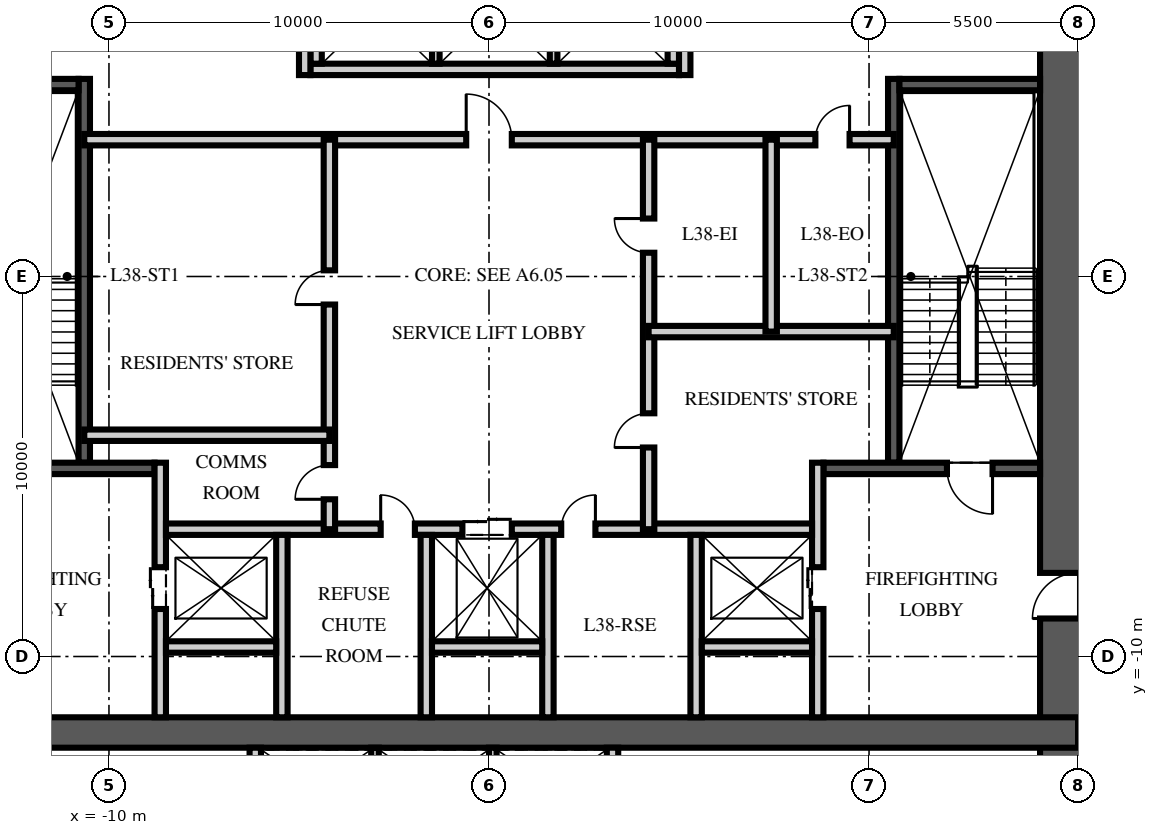
"""IFC4 building model, lengths in metres.
Left out: names, types, materials, properties, quantities, classifications, styles, units other than length and angle.
Written with IfcOpenShell. Run it as: python <this file> out.ifc"""

import sys

from ifc_helpers import new_model, si_unit, direction, frame, frame_2d, origin, place, context, subcontext, project, spatial, rectangle, extrude, element, fill, save


model = new_model("IFC4")
c1 = context("Model", 3, precision=1e-05, world=origin(), true_north=direction((0.0, 1.0)))
c2 = subcontext(c1, "Body", "Model", "MODEL_VIEW")
j1 = project(units=[si_unit("LENGTHUNIT", "METRE"), si_unit("PLANEANGLEUNIT", "RADIAN")], contexts=[c1])
p1 = place(None, origin())
s1 = spatial("IfcSite", under=j1, at=p1, CompositionType="ELEMENT")
p2 = place(p1, origin())
s2 = spatial("IfcBuilding", under=s1, at=p2, CompositionType="ELEMENT")
p3 = place(p2, frame((0.0, 0.0, 152.25)))
s3 = spatial("IfcBuildingStorey", under=s2, at=p3, CompositionType="ELEMENT", Elevation=152.25)
p4 = place(p3, frame((15.5, -15.5, -0.25), z_axis=(0.0, 0.0, 1.0), x_axis=(0.0, 1.0, 0.0)))
e1 = element("IfcWall", 1, at=p4, inside=s3, PredefinedType="SHEAR", context=c2, shape_type="SweptSolid", body=[
    extrude(rectangle(XDim=31.0, YDim=2.0, at=frame_2d((15.5, 0.0))), origin(), (0.0, 0.0, 1.0), 3.75),
])
p5 = place(p4, frame((6.5, 0.0, 0.25)))
e2 = element("IfcOpeningElement", 2, at=p5, cuts=e1, PredefinedType="OPENING", context=c2, shape_type="SweptSolid", body=[
    extrude(rectangle(XDim=1.2, YDim=2.1, at=frame_2d((0.6, 1.05))), frame((0.0, 1.01, 0.0), z_axis=(0.0, -1.0, 0.0), x_axis=(1.0, 0.0, 0.0)), (0.0, 0.0, 1.0), 2.02),
])
p6 = place(p4, frame((23.0, 0.0, 0.25)))
e3 = element("IfcOpeningElement", 3, at=p6, cuts=e1, PredefinedType="OPENING", context=c2, shape_type="SweptSolid", body=[
    extrude(rectangle(XDim=1.8, YDim=2.1, at=frame_2d((0.9, 1.05))), frame((0.0, 1.01, 0.0), z_axis=(0.0, -1.0, 0.0), x_axis=(1.0, 0.0, 0.0)), (0.0, 0.0, 1.0), 2.02),
])
p7 = place(p3, frame((-15.5, -12.0, -0.25), z_axis=(0.0, 0.0, 1.0), x_axis=(1.0, 0.0, 0.0)))
e4 = element("IfcWall", 4, at=p7, inside=s3, PredefinedType="SHEAR", context=c2, shape_type="SweptSolid", body=[
    extrude(rectangle(XDim=31.0, YDim=0.8, at=frame_2d((15.5, 0.0))), origin(), (0.0, 0.0, 1.0), 3.75),
])
p8 = place(p3, frame((-10.65, -4.9, 0.0), z_axis=(0.0, 0.0, 1.0), x_axis=(0.0, 1.0, 0.0)))
e5 = element("IfcWall", 5, at=p8, inside=s3, PredefinedType="SOLIDWALL", context=c2, shape_type="SweptSolid", body=[
    extrude(rectangle(XDim=10.1, YDim=0.3, at=frame_2d((5.05, 0.0))), origin(), (0.0, 0.0, 1.0), 3.5),
])
p9 = place(p3, frame((-14.5, -5.05, 0.0), z_axis=(0.0, 0.0, 1.0), x_axis=(1.0, 0.0, 0.0)))
e6 = element("IfcWall", 6, at=p9, inside=s3, PredefinedType="SOLIDWALL", context=c2, shape_type="SweptSolid", body=[
    extrude(rectangle(XDim=5.7, YDim=0.3, at=frame_2d((2.85, 0.0))), origin(), (0.0, 0.0, 1.0), 3.5),
])
p10 = place(p9, frame((1.25, 0.0, 0.0)))
e7 = element("IfcOpeningElement", 7, at=p10, cuts=e6, PredefinedType="OPENING", context=c2, shape_type="SweptSolid", body=[
    extrude(rectangle(XDim=1.2, YDim=2.1, at=frame_2d((0.6, 1.05))), frame((0.0, 0.16, 0.0), z_axis=(0.0, -1.0, 0.0), x_axis=(1.0, 0.0, 0.0)), (0.0, 0.0, 1.0), 0.32),
])
p11 = place(p3, frame((-14.5, 5.05, 0.0), z_axis=(0.0, 0.0, 1.0), x_axis=(1.0, 0.0, 0.0)))
e8 = element("IfcWall", 8, at=p11, inside=s3, PredefinedType="SOLIDWALL", context=c2, shape_type="SweptSolid", body=[
    extrude(rectangle(XDim=3.7, YDim=0.3, at=frame_2d((1.85, 0.0))), origin(), (0.0, 0.0, 1.0), 3.5),
])
p12 = place(p3, frame((-8.65, -11.6, 0.0), z_axis=(0.0, 0.0, 1.0), x_axis=(0.0, 1.0, 0.0)))
e9 = element("IfcWall", 9, at=p12, inside=s3, PredefinedType="PARTITIONING", context=c2, shape_type="SweptSolid", body=[
    extrude(rectangle(XDim=6.7, YDim=0.3, at=frame_2d((3.35, 0.0))), origin(), (0.0, 0.0, 1.0), 3.5),
])
p13 = place(p12, frame((2.85, 0.0, 0.0)))
e10 = element("IfcOpeningElement", 10, at=p13, cuts=e9, PredefinedType="OPENING", context=c2, shape_type="SweptSolid", body=[
    extrude(rectangle(XDim=1.1, YDim=2.1, at=frame_2d((0.55, 1.05))), frame((0.0, 0.16, 0.0), z_axis=(0.0, -1.0, 0.0), x_axis=(1.0, 0.0, 0.0)), (0.0, 0.0, 1.0), 0.32),
])
p14 = place(p3, frame((10.65, -4.9, 0.0), z_axis=(0.0, 0.0, 1.0), x_axis=(0.0, 1.0, 0.0)))
e11 = element("IfcWall", 11, at=p14, inside=s3, PredefinedType="SOLIDWALL", context=c2, shape_type="SweptSolid", body=[
    extrude(rectangle(XDim=10.1, YDim=0.3, at=frame_2d((5.05, 0.0))), origin(), (0.0, 0.0, 1.0), 3.5),
])
p15 = place(p3, frame((14.5, -5.05, 0.0), z_axis=(0.0, 0.0, 1.0), x_axis=(-1.0, 0.0, 0.0)))
e12 = element("IfcWall", 12, at=p15, inside=s3, PredefinedType="SOLIDWALL", context=c2, shape_type="SweptSolid", body=[
    extrude(rectangle(XDim=5.7, YDim=0.3, at=frame_2d((2.85, 0.0))), origin(), (0.0, 0.0, 1.0), 3.5),
])
p16 = place(p15, frame((1.25, 0.0, 0.0)))
e13 = element("IfcOpeningElement", 13, at=p16, cuts=e12, PredefinedType="OPENING", context=c2, shape_type="SweptSolid", body=[
    extrude(rectangle(XDim=1.2, YDim=2.1, at=frame_2d((0.6, 1.05))), frame((0.0, 0.16, 0.0), z_axis=(0.0, -1.0, 0.0), x_axis=(1.0, 0.0, 0.0)), (0.0, 0.0, 1.0), 0.32),
])
p17 = place(p3, frame((14.5, 5.05, 0.0), z_axis=(0.0, 0.0, 1.0), x_axis=(-1.0, 0.0, 0.0)))
e14 = element("IfcWall", 14, at=p17, inside=s3, PredefinedType="SOLIDWALL", context=c2, shape_type="SweptSolid", body=[
    extrude(rectangle(XDim=3.7, YDim=0.3, at=frame_2d((1.85, 0.0))), origin(), (0.0, 0.0, 1.0), 3.5),
])
p18 = place(p3, frame((8.65, -11.6, 0.0), z_axis=(0.0, 0.0, 1.0), x_axis=(0.0, 1.0, 0.0)))
e15 = element("IfcWall", 15, at=p18, inside=s3, PredefinedType="PARTITIONING", context=c2, shape_type="SweptSolid", body=[
    extrude(rectangle(XDim=6.7, YDim=0.3, at=frame_2d((3.35, 0.0))), origin(), (0.0, 0.0, 1.0), 3.5),
])
p19 = place(p18, frame((2.85, 0.0, 0.0)))
e16 = element("IfcOpeningElement", 16, at=p19, cuts=e15, PredefinedType="OPENING", context=c2, shape_type="SweptSolid", body=[
    extrude(rectangle(XDim=1.1, YDim=2.1, at=frame_2d((0.55, 1.05))), frame((0.0, 0.16, 0.0), z_axis=(0.0, -1.0, 0.0), x_axis=(1.0, 0.0, 0.0)), (0.0, 0.0, 1.0), 0.32),
])
p20 = place(p3, frame((-8.5, -6.65, 0.0), z_axis=(0.0, 0.0, 1.0), x_axis=(1.0, 0.0, 0.0)))
e17 = element("IfcWall", 17, at=p20, inside=s3, PredefinedType="PARTITIONING", context=c2, shape_type="SweptSolid", body=[
    extrude(rectangle(XDim=17.0, YDim=0.3, at=frame_2d((8.5, 0.0))), origin(), (0.0, 0.0, 1.0), 3.5),
])
p21 = place(p20, frame((7.8, 0.0, 0.0)))
e18 = element("IfcOpeningElement", 18, at=p21, cuts=e17, PredefinedType="OPENING", context=c2, shape_type="SweptSolid", body=[
    extrude(rectangle(XDim=1.3, YDim=2.4, at=frame_2d((0.65, 1.2))), frame((0.0, 0.16, 0.0), z_axis=(0.0, -1.0, 0.0), x_axis=(1.0, 0.0, 0.0)), (0.0, 0.0, 1.0), 0.32),
])
p22 = place(p20, frame((5.65, 0.0, 0.0)))
e19 = element("IfcOpeningElement", 19, at=p22, cuts=e17, PredefinedType="OPENING", context=c2, shape_type="SweptSolid", body=[
    extrude(rectangle(XDim=0.9, YDim=2.1, at=frame_2d((0.45, 1.05))), frame((0.0, 0.16, 0.0), z_axis=(0.0, -1.0, 0.0), x_axis=(1.0, 0.0, 0.0)), (0.0, 0.0, 1.0), 0.32),
])
p23 = place(p20, frame((10.4, 0.0, 0.0)))
e20 = element("IfcOpeningElement", 20, at=p23, cuts=e17, PredefinedType="OPENING", context=c2, shape_type="SweptSolid", body=[
    extrude(rectangle(XDim=0.9, YDim=2.1, at=frame_2d((0.45, 1.05))), frame((0.0, 0.16, 0.0), z_axis=(0.0, -1.0, 0.0), x_axis=(1.0, 0.0, 0.0)), (0.0, 0.0, 1.0), 0.32),
])
for number, where, z_axis, x_axis in (
    (21, (-5.45, -11.6, 0.0), (0.0, 0.0, 1.0), (0.0, 1.0, 0.0)),
    (22, (-1.65, -11.6, 0.0), (0.0, 0.0, 1.0), (0.0, 1.0, 0.0)),
    (23, (1.55, -11.6, 0.0), (0.0, 0.0, 1.0), (0.0, 1.0, 0.0)),
    (24, (5.45, -11.6, 0.0), (0.0, 0.0, 1.0), (0.0, 1.0, 0.0)),
):
    element("IfcWall", number, at=place(p3, frame(where, z_axis=z_axis, x_axis=x_axis)), inside=s3, PredefinedType="PARTITIONING", context=c2, shape_type="SweptSolid", body=[
        extrude(rectangle(XDim=4.8, YDim=0.3, at=frame_2d((2.4, 0.0))), origin(), (0.0, 0.0, 1.0), 3.5),
    ])
for number, where, z_axis, x_axis in (
    (25, (-8.5, -9.75, 0.0), (0.0, 0.0, 1.0), (1.0, 0.0, 0.0)),
    (26, (-1.5, -9.75, 0.0), (0.0, 0.0, 1.0), (1.0, 0.0, 0.0)),
    (27, (5.6, -9.75, 0.0), (0.0, 0.0, 1.0), (1.0, 0.0, 0.0)),
):
    element("IfcWall", number, at=place(p3, frame(where, z_axis=z_axis, x_axis=x_axis)), inside=s3, PredefinedType="PARTITIONING", context=c2, shape_type="SweptSolid", body=[
        extrude(rectangle(XDim=2.9, YDim=0.3, at=frame_2d((1.45, 0.0))), origin(), (0.0, 0.0, 1.0), 3.5),
    ])
p24 = place(p3, frame((-4.7, 5.45, 0.0), z_axis=(0.0, 0.0, 1.0), x_axis=(1.0, 0.0, 0.0)))
e28 = element("IfcWall", 28, at=p24, inside=s3, PredefinedType="PARTITIONING", context=c2, shape_type="SweptSolid", body=[
    extrude(rectangle(XDim=9.7, YDim=0.3, at=frame_2d((4.85, 0.0))), origin(), (0.0, 0.0, 1.0), 3.5),
])
for number, where, z_axis, x_axis in (
    (29, (-4.55, 5.6, 0.0), (0.0, 0.0, 1.0), (0.0, 1.0, 0.0)),
    (30, (4.85, 5.6, 0.0), (0.0, 0.0, 1.0), (0.0, 1.0, 0.0)),
):
    element("IfcWall", number, at=place(p3, frame(where, z_axis=z_axis, x_axis=x_axis)), inside=s3, PredefinedType="PARTITIONING", context=c2, shape_type="SweptSolid", body=[
        extrude(rectangle(XDim=2.8, YDim=0.3, at=frame_2d((1.4, 0.0))), origin(), (0.0, 0.0, 1.0), 3.5),
    ])
for number, where, z_axis, x_axis in (
    (31, (-1.4, 5.6, 0.0), (0.0, 0.0, 1.0), (0.0, 1.0, 0.0)),
    (32, (1.7, 5.6, 0.0), (0.0, 0.0, 1.0), (0.0, 1.0, 0.0)),
):
    element("IfcWall", number, at=place(p3, frame(where, z_axis=z_axis, x_axis=x_axis)), inside=s3, PredefinedType="PARTITIONING", context=c2, shape_type="SweptSolid", body=[
        extrude(rectangle(XDim=2.8, YDim=0.2, at=frame_2d((1.4, 0.0))), origin(), (0.0, 0.0, 1.0), 3.5),
    ])
for number, where, z_axis, x_axis in (
    (33, (-6.15, -14.5, 0.0), (0.0, 0.0, 1.0), (0.0, 1.0, 0.0)),
    (34, (3.25, -14.5, 0.0), (0.0, 0.0, 1.0), (0.0, 1.0, 0.0)),
):
    element("IfcWall", number, at=place(p3, frame(where, z_axis=z_axis, x_axis=x_axis)), inside=s3, PredefinedType="PARTITIONING", context=c2, shape_type="SweptSolid", body=[
        extrude(rectangle(XDim=2.1, YDim=0.3, at=frame_2d((1.05, 0.0))), origin(), (0.0, 0.0, 1.0), 3.5),
    ])
for number, where, z_axis, x_axis in (
    (35, (-3.0, -14.5, 0.0), (0.0, 0.0, 1.0), (0.0, 1.0, 0.0)),
    (36, (0.1, -14.5, 0.0), (0.0, 0.0, 1.0), (0.0, 1.0, 0.0)),
):
    element("IfcWall", number, at=place(p3, frame(where, z_axis=z_axis, x_axis=x_axis)), inside=s3, PredefinedType="PARTITIONING", context=c2, shape_type="SweptSolid", body=[
        extrude(rectangle(XDim=2.1, YDim=0.2, at=frame_2d((1.05, 0.0))), origin(), (0.0, 0.0, 1.0), 3.5),
    ])
p25 = place(p3, frame((-10.65, 3.6, 0.0), z_axis=(0.0, 0.0, 1.0), x_axis=(1.0, 0.0, 0.0)))
e37 = element("IfcWall", 37, at=p25, inside=s3, PredefinedType="PARTITIONING", context=c2, shape_type="SweptSolid", body=[
    extrude(rectangle(XDim=21.3, YDim=0.3, at=frame_2d((10.65, 0.0))), origin(), (0.0, 0.0, 1.0), 3.5),
])
p26 = place(p25, frame((10.05, 0.0, 0.0)))
e38 = element("IfcOpeningElement", 38, at=p26, cuts=e37, PredefinedType="OPENING", context=c2, shape_type="SweptSolid", body=[
    extrude(rectangle(XDim=1.2, YDim=2.1, at=frame_2d((0.6, 1.05))), frame((0.0, 0.16, 0.0), z_axis=(0.0, -1.0, 0.0), x_axis=(1.0, 0.0, 0.0)), (0.0, 0.0, 1.0), 0.32),
])
p27 = place(p25, frame((19.238, 0.0, 0.0)))
e39 = element("IfcOpeningElement", 39, at=p27, cuts=e37, PredefinedType="OPENING", context=c2, shape_type="SweptSolid", body=[
    extrude(rectangle(XDim=0.9, YDim=2.1, at=frame_2d((0.45, 1.05))), frame((0.0, 0.16, 0.0), z_axis=(0.0, -1.0, 0.0), x_axis=(1.0, 0.0, 0.0)), (0.0, 0.0, 1.0), 0.32),
])
p28 = place(p3, frame((-4.2, -6.65, 0.0), z_axis=(0.0, 0.0, 1.0), x_axis=(0.0, 1.0, 0.0)))
e40 = element("IfcWall", 40, at=p28, inside=s3, PredefinedType="PARTITIONING", context=c2, shape_type="SweptSolid", body=[
    extrude(rectangle(XDim=10.25, YDim=0.3, at=frame_2d((5.125, 0.0))), origin(), (0.0, 0.0, 1.0), 3.5),
])
p29 = place(p28, frame((0.787, 0.0, 0.0)))
e41 = element("IfcOpeningElement", 41, at=p29, cuts=e40, PredefinedType="OPENING", context=c2, shape_type="SweptSolid", body=[
    extrude(rectangle(XDim=0.9, YDim=2.1, at=frame_2d((0.45, 1.05))), frame((0.0, 0.16, 0.0), z_axis=(0.0, -1.0, 0.0), x_axis=(1.0, 0.0, 0.0)), (0.0, 0.0, 1.0), 0.32),
])
p30 = place(p28, frame((5.912, 0.0, 0.0)))
e42 = element("IfcOpeningElement", 42, at=p30, cuts=e40, PredefinedType="OPENING", context=c2, shape_type="SweptSolid", body=[
    extrude(rectangle(XDim=0.9, YDim=2.1, at=frame_2d((0.45, 1.05))), frame((0.0, 0.16, 0.0), z_axis=(0.0, -1.0, 0.0), x_axis=(1.0, 0.0, 0.0)), (0.0, 0.0, 1.0), 0.32),
])
p31 = place(p3, frame((4.2, -6.65, 0.0), z_axis=(0.0, 0.0, 1.0), x_axis=(0.0, 1.0, 0.0)))
e43 = element("IfcWall", 43, at=p31, inside=s3, PredefinedType="PARTITIONING", context=c2, shape_type="SweptSolid", body=[
    extrude(rectangle(XDim=10.25, YDim=0.3, at=frame_2d((5.125, 0.0))), origin(), (0.0, 0.0, 1.0), 3.5),
])
p32 = place(p31, frame((2.15, 0.0, 0.0)))
e44 = element("IfcOpeningElement", 44, at=p32, cuts=e43, PredefinedType="OPENING", context=c2, shape_type="SweptSolid", body=[
    extrude(rectangle(XDim=0.9, YDim=2.1, at=frame_2d((0.45, 1.05))), frame((0.0, 0.16, 0.0), z_axis=(0.0, -1.0, 0.0), x_axis=(1.0, 0.0, 0.0)), (0.0, 0.0, 1.0), 0.32),
])
p33 = place(p31, frame((7.275, 0.0, 0.0)))
e45 = element("IfcOpeningElement", 45, at=p33, cuts=e43, PredefinedType="OPENING", context=c2, shape_type="SweptSolid", body=[
    extrude(rectangle(XDim=0.9, YDim=2.1, at=frame_2d((0.45, 1.05))), frame((0.0, 0.16, 0.0), z_axis=(0.0, -1.0, 0.0), x_axis=(1.0, 0.0, 0.0)), (0.0, 0.0, 1.0), 0.32),
])
for number, where, z_axis, x_axis in (
    (46, (-10.65, -4.177, 0.0), (0.0, 0.0, 1.0), (1.0, 0.0, 0.0)),
    (47, (10.65, -1.45, 0.0), (0.0, 0.0, 1.0), (-1.0, 0.0, 0.0)),
):
    element("IfcWall", number, at=place(p3, frame(where, z_axis=z_axis, x_axis=x_axis)), inside=s3, PredefinedType="PARTITIONING", context=c2, shape_type="SweptSolid", body=[
        extrude(rectangle(XDim=6.45, YDim=0.3, at=frame_2d((3.225, 0.0))), origin(), (0.0, 0.0, 1.0), 3.5),
    ])
p34 = place(p3, frame((7.425, -1.45, 0.0), z_axis=(0.0, 0.0, 1.0), x_axis=(0.0, 1.0, 0.0)))
e48 = element("IfcWall", 48, at=p34, inside=s3, PredefinedType="PARTITIONING", context=c2, shape_type="SweptSolid", body=[
    extrude(rectangle(XDim=5.05, YDim=0.3, at=frame_2d((2.525, 0.0))), origin(), (0.0, 0.0, 1.0), 3.5),
])
p35 = place(p3, frame((-4.85, 5.3, 0.0), z_axis=(0.0, 0.0, 1.0), x_axis=(0.0, 1.0, 0.0)))
e49 = element("IfcWall", 49, at=p35, inside=s3, PredefinedType="PARTITIONING", context=c2, shape_type="SweptSolid", body=[
    extrude(rectangle(XDim=6.3, YDim=0.3, at=frame_2d((3.15, 0.0))), origin(), (0.0, 0.0, 1.0), 3.5),
])
p36 = place(p35, frame((4.35, 0.0, 0.0)))
e50 = element("IfcOpeningElement", 50, at=p36, cuts=e49, PredefinedType="OPENING", context=c2, shape_type="SweptSolid", body=[
    extrude(rectangle(XDim=0.9, YDim=2.1, at=frame_2d((0.45, 1.05))), frame((0.0, 0.16, 0.0), z_axis=(0.0, -1.0, 0.0), x_axis=(1.0, 0.0, 0.0)), (0.0, 0.0, 1.0), 0.32),
])
p37 = place(p3, frame((5.15, 5.3, 0.0), z_axis=(0.0, 0.0, 1.0), x_axis=(0.0, 1.0, 0.0)))
e51 = element("IfcWall", 51, at=p37, inside=s3, PredefinedType="PARTITIONING", context=c2, shape_type="SweptSolid", body=[
    extrude(rectangle(XDim=6.3, YDim=0.3, at=frame_2d((3.15, 0.0))), origin(), (0.0, 0.0, 1.0), 3.5),
])
p38 = place(p37, frame((4.35, 0.0, 0.0)))
e52 = element("IfcOpeningElement", 52, at=p38, cuts=e51, PredefinedType="OPENING", context=c2, shape_type="SweptSolid", body=[
    extrude(rectangle(XDim=0.9, YDim=2.1, at=frame_2d((0.45, 1.05))), frame((0.0, 0.16, 0.0), z_axis=(0.0, -1.0, 0.0), x_axis=(1.0, 0.0, 0.0)), (0.0, 0.0, 1.0), 0.32),
])
p39 = place(p16, origin())
e53 = element("IfcDoor", 53, at=p39, inside=s3, OperationType="SINGLE_SWING_LEFT", PredefinedType="DOOR", context=c2, shape_type="SweptSolid", body=[
    extrude(rectangle(XDim=1.2, YDim=2.1, at=frame_2d((0.6, 1.05))), frame((0.0, 0.025, 0.0), z_axis=(0.0, -1.0, 0.0), x_axis=(1.0, 0.0, 0.0)), (0.0, 0.0, 1.0), 0.05),
])
fill(e13, e53)
p40 = place(p5, origin())
e54 = element("IfcDoor", 54, at=p40, inside=s3, OperationType="SINGLE_SWING_LEFT", PredefinedType="DOOR", context=c2, shape_type="SweptSolid", body=[
    extrude(rectangle(XDim=1.2, YDim=2.1, at=frame_2d((0.6, 1.05))), frame((0.0, 0.025, 0.0), z_axis=(0.0, -1.0, 0.0), x_axis=(1.0, 0.0, 0.0)), (0.0, 0.0, 1.0), 0.05),
])
fill(e2, e54)
p41 = place(p13, origin())
e55 = element("IfcDoor", 55, at=p41, inside=s3, OperationType="DOUBLE_DOOR_SLIDING", PredefinedType="DOOR", context=c2, shape_type="SweptSolid", body=[
    extrude(rectangle(XDim=1.1, YDim=2.1, at=frame_2d((0.55, 1.05))), frame((0.0, 0.025, 0.0), z_axis=(0.0, -1.0, 0.0), x_axis=(1.0, 0.0, 0.0)), (0.0, 0.0, 1.0), 0.05),
])
fill(e10, e55)
p42 = place(p19, origin())
e56 = element("IfcDoor", 56, at=p42, inside=s3, OperationType="DOUBLE_DOOR_SLIDING", PredefinedType="DOOR", context=c2, shape_type="SweptSolid", body=[
    extrude(rectangle(XDim=1.1, YDim=2.1, at=frame_2d((0.55, 1.05))), frame((0.0, 0.025, 0.0), z_axis=(0.0, -1.0, 0.0), x_axis=(1.0, 0.0, 0.0)), (0.0, 0.0, 1.0), 0.05),
])
fill(e16, e56)
p43 = place(p21, origin())
e57 = element("IfcDoor", 57, at=p43, inside=s3, OperationType="DOUBLE_DOOR_SLIDING", PredefinedType="DOOR", context=c2, shape_type="SweptSolid", body=[
    extrude(rectangle(XDim=1.3, YDim=2.4, at=frame_2d((0.65, 1.2))), frame((0.0, 0.025, 0.0), z_axis=(0.0, -1.0, 0.0), x_axis=(1.0, 0.0, 0.0)), (0.0, 0.0, 1.0), 0.05),
])
fill(e18, e57)
p44 = place(p26, origin())
e58 = element("IfcDoor", 58, at=p44, inside=s3, OperationType="SINGLE_SWING_LEFT", PredefinedType="DOOR", context=c2, shape_type="SweptSolid", body=[
    extrude(rectangle(XDim=1.2, YDim=2.1, at=frame_2d((0.6, 1.05))), frame((0.0, 0.025, 0.0), z_axis=(0.0, -1.0, 0.0), x_axis=(1.0, 0.0, 0.0)), (0.0, 0.0, 1.0), 0.05),
])
fill(e38, e58)
p45 = place(p22, origin())
e59 = element("IfcDoor", 59, at=p45, inside=s3, OperationType="SINGLE_SWING_LEFT", PredefinedType="DOOR", context=c2, shape_type="SweptSolid", body=[
    extrude(rectangle(XDim=0.9, YDim=2.1, at=frame_2d((0.45, 1.05))), frame((0.0, 0.025, 0.0), z_axis=(0.0, -1.0, 0.0), x_axis=(1.0, 0.0, 0.0)), (0.0, 0.0, 1.0), 0.05),
])
fill(e19, e59)
p46 = place(p23, origin())
e60 = element("IfcDoor", 60, at=p46, inside=s3, OperationType="SINGLE_SWING_RIGHT", PredefinedType="DOOR", context=c2, shape_type="SweptSolid", body=[
    extrude(rectangle(XDim=0.9, YDim=2.1, at=frame_2d((0.45, 1.05))), frame((0.0, 0.025, 0.0), z_axis=(0.0, -1.0, 0.0), x_axis=(1.0, 0.0, 0.0)), (0.0, 0.0, 1.0), 0.05),
])
fill(e20, e60)
p47 = place(p29, origin())
e61 = element("IfcDoor", 61, at=p47, inside=s3, OperationType="SINGLE_SWING_LEFT", PredefinedType="DOOR", context=c2, shape_type="SweptSolid", body=[
    extrude(rectangle(XDim=0.9, YDim=2.1, at=frame_2d((0.45, 1.05))), frame((0.0, 0.025, 0.0), z_axis=(0.0, -1.0, 0.0), x_axis=(1.0, 0.0, 0.0)), (0.0, 0.0, 1.0), 0.05),
])
fill(e41, e61)
p48 = place(p30, origin())
e62 = element("IfcDoor", 62, at=p48, inside=s3, OperationType="SINGLE_SWING_LEFT", PredefinedType="DOOR", context=c2, shape_type="SweptSolid", body=[
    extrude(rectangle(XDim=0.9, YDim=2.1, at=frame_2d((0.45, 1.05))), frame((0.0, 0.025, 0.0), z_axis=(0.0, -1.0, 0.0), x_axis=(1.0, 0.0, 0.0)), (0.0, 0.0, 1.0), 0.05),
])
fill(e42, e62)
p49 = place(p32, origin())
e63 = element("IfcDoor", 63, at=p49, inside=s3, OperationType="SINGLE_SWING_LEFT", PredefinedType="DOOR", context=c2, shape_type="SweptSolid", body=[
    extrude(rectangle(XDim=0.9, YDim=2.1, at=frame_2d((0.45, 1.05))), frame((0.0, 0.025, 0.0), z_axis=(0.0, -1.0, 0.0), x_axis=(1.0, 0.0, 0.0)), (0.0, 0.0, 1.0), 0.05),
])
fill(e44, e63)
p50 = place(p33, origin())
e64 = element("IfcDoor", 64, at=p50, inside=s3, OperationType="SINGLE_SWING_RIGHT", PredefinedType="DOOR", context=c2, shape_type="SweptSolid", body=[
    extrude(rectangle(XDim=0.9, YDim=2.1, at=frame_2d((0.45, 1.05))), frame((0.0, 0.025, 0.0), z_axis=(0.0, -1.0, 0.0), x_axis=(1.0, 0.0, 0.0)), (0.0, 0.0, 1.0), 0.05),
])
fill(e45, e64)
p51 = place(p27, origin())
e65 = element("IfcDoor", 65, at=p51, inside=s3, OperationType="SINGLE_SWING_RIGHT", PredefinedType="DOOR", context=c2, shape_type="SweptSolid", body=[
    extrude(rectangle(XDim=0.9, YDim=2.1, at=frame_2d((0.45, 1.05))), frame((0.0, 0.025, 0.0), z_axis=(0.0, -1.0, 0.0), x_axis=(1.0, 0.0, 0.0)), (0.0, 0.0, 1.0), 0.05),
])
fill(e39, e65)
save(model, sys.argv[1])
